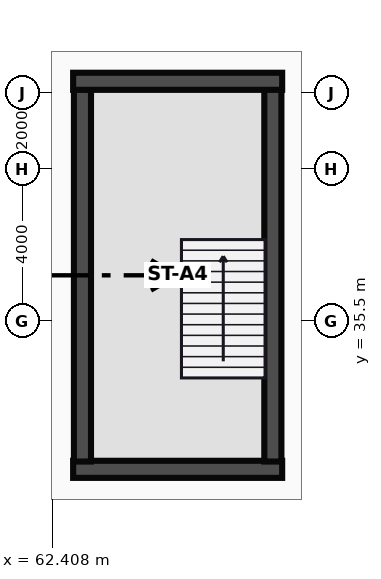
"""IFC4 building model, lengths in metres.
Left out: names, types, materials, properties, quantities, classifications, styles, units other than length and angle.
Written with IfcOpenShell. Run it as: python <this file> out.ifc"""

import sys

from ifc_helpers import new_model, si_unit, direction, frame, frame_2d, origin, place, context, subcontext, project, spatial, rectangle, extrude, source, transform, mapped, element, fill, save


model = new_model("IFC4")
c1 = context("Model", 3, precision=1e-05, world=origin(), true_north=direction((0.0, 1.0)))
c2 = subcontext(c1, "Body", "Model", "MODEL_VIEW")
j1 = project(units=[si_unit("LENGTHUNIT", "METRE"), si_unit("PLANEANGLEUNIT", "RADIAN")], contexts=[c1])
p1 = place(None, origin())
s1 = spatial("IfcSite", under=j1, at=p1, CompositionType="ELEMENT")
p2 = place(p1, origin())
s2 = spatial("IfcBuilding", under=s1, at=p2, CompositionType="ELEMENT")
p3 = place(p2, frame((0.0, 0.0, 6.0)))
s3 = spatial("IfcBuildingStorey", under=s2, at=p3, CompositionType="ELEMENT", Elevation=6.0)
m1 = source(origin(), c2, "Body", "SweptSolid", [
    extrude(rectangle(XDim=5.5, YDim=0.45, at=frame_2d((2.75, 0.0))), origin(), (0.0, 0.0, 1.0), 5.0),
])
p4 = place(p3, frame((62.95, 31.595, 0.0), z_axis=(0.0, 0.0, 1.0), x_axis=(1.0, 0.0, 0.0)))
e1 = element("IfcWall", 1, at=p4, inside=s3, PredefinedType="SHEAR", context=c2, shape_type="MappedRepresentation", body=[
    mapped(m1, transform((0.0, 0.0, 0.0))),
])
p5 = place(p4, frame((2.2, 0.0, 0.0)))
e2 = element("IfcOpeningElement", 2, at=p5, cuts=e1, PredefinedType="OPENING", context=c2, shape_type="SweptSolid", body=[
    extrude(rectangle(XDim=1.1, YDim=2.15, at=frame_2d((0.55, 1.075))), frame((0.0, 0.235, 0.0), z_axis=(0.0, -1.0, 0.0), x_axis=(1.0, 0.0, 0.0)), (0.0, 0.0, 1.0), 0.47),
])
m2 = source(origin(), c2, "Body", "SweptSolid", [
    extrude(rectangle(XDim=9.8, YDim=0.45, at=frame_2d((4.9, 0.0))), origin(), (0.0, 0.0, 1.0), 5.0),
])
for number, where, z_axis, x_axis in (
    (3, (63.195, 31.8, 0.0), (0.0, 0.0, 1.0), (0.0, 1.0, 0.0)),
    (4, (68.205, 31.8, 0.0), (0.0, 0.0, 1.0), (0.0, 1.0, 0.0)),
):
    element("IfcWall", number, at=place(p3, frame(where, z_axis=z_axis, x_axis=x_axis)), inside=s3, PredefinedType="SHEAR", context=c2, shape_type="MappedRepresentation", body=[
        mapped(m2, transform((0.0, 0.0, 0.0))),
    ])
p6 = place(p3, frame((62.95, 41.805, 0.0), z_axis=(0.0, 0.0, 1.0), x_axis=(1.0, 0.0, 0.0)))
e5 = element("IfcWall", 5, at=p6, inside=s3, PredefinedType="SHEAR", context=c2, shape_type="MappedRepresentation", body=[
    mapped(m1, transform((0.0, 0.0, 0.0))),
])
m3 = source(origin(), c2, "Body", "SweptSolid", [
    extrude(rectangle(XDim=1.1, YDim=2.15, at=frame_2d((0.55, 1.075))), frame((0.0, 0.025, 0.0), z_axis=(0.0, -1.0, 0.0), x_axis=(1.0, 0.0, 0.0)), (0.0, 0.0, 1.0), 0.05),
])
p7 = place(p5, origin())
e6 = element("IfcDoor", 6, at=p7, inside=s3, OperationType="SINGLE_SWING_RIGHT", PredefinedType="DOOR", context=c2, shape_type="MappedRepresentation", body=[
    mapped(m3, transform((0.0, 0.0, 0.0))),
])
fill(e2, e6)
save(model, sys.argv[1])
